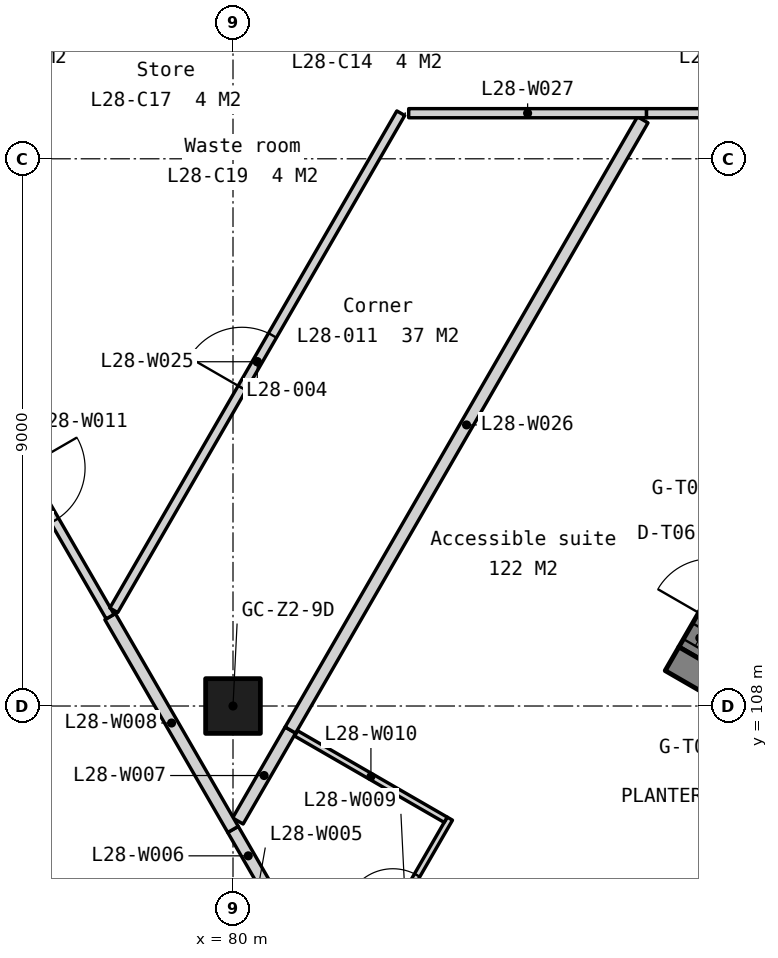
"""IFC4 building model, lengths in metres.
Left out: names, types, materials, properties, quantities, classifications, styles, units other than length and angle.
Written with IfcOpenShell. Run it as: python <this file> out.ifc"""

import sys

from ifc_helpers import new_model, si_unit, direction, frame, frame_2d, origin, origin_2d, place, context, subcontext, project, spatial, polyline, rectangle, outline, extrude, element, fill, save


model = new_model("IFC4")
c1 = context("Model", 3, precision=1e-05, world=origin(), true_north=direction((0.0, 1.0)))
c2 = subcontext(c1, "Body", "Model", "MODEL_VIEW")
j1 = project(units=[si_unit("LENGTHUNIT", "METRE"), si_unit("PLANEANGLEUNIT", "RADIAN")], contexts=[c1])
p1 = place(None, origin())
s1 = spatial("IfcSite", under=j1, at=p1, CompositionType="ELEMENT")
p2 = place(p1, origin())
s2 = spatial("IfcBuilding", under=s1, at=p2, CompositionType="ELEMENT")
p3 = place(p2, frame((0.0, 0.0, 113.3)))
s3 = spatial("IfcBuildingStorey", under=s2, at=p3, CompositionType="ELEMENT", Elevation=113.3)
p4 = place(p3, frame((80.0, 108.0, 0.0), z_axis=(0.0, 0.0, 1.0), x_axis=(1.0, 0.0, 0.0)))
e1 = element("IfcColumn", 1, at=p4, inside=s3, PredefinedType="COLUMN", context=c2, shape_type="SweptSolid", body=[
    extrude(rectangle(XDim=0.9, YDim=0.9, at=origin_2d()), origin(), (0.0, 0.0, 1.0), 3.5),
])
p5 = place(p3, frame((56.073, 130.263, -0.15), z_axis=(0.0, 0.0, 1.0), x_axis=(0.500000478905, -0.866025127289, 0.0)))
e2 = element("IfcWall", 2, at=p5, inside=s3, PredefinedType="SOLIDWALL", context=c2, shape_type="SweptSolid", body=[
    extrude(outline(polyline([(42.643, 0.0), (42.643, 3.5), (0.0, 3.5), (0.0, 0.0), (42.643, 0.0)])), frame((0.0, 0.225, 0.0), z_axis=(0.0, -1.0, 0.0), x_axis=(1.0, 0.0, 0.0)), (0.0, 0.0, 1.0), 0.45),
])
p6 = place(p5, frame((7.079, 0.0, 1.05)))
e3 = element("IfcOpeningElement", 3, at=p6, cuts=e2, PredefinedType="OPENING", context=c2, shape_type="SweptSolid", body=[
    extrude(rectangle(XDim=1.2, YDim=1.5, at=frame_2d((0.6, 0.75))), frame((0.0, 0.235, 0.0), z_axis=(0.0, -1.0, 0.0), x_axis=(1.0, 0.0, 0.0)), (0.0, 0.0, 1.0), 0.47),
])
p7 = place(p5, frame((8.779, 0.0, 1.05)))
e4 = element("IfcOpeningElement", 4, at=p7, cuts=e2, PredefinedType="OPENING", context=c2, shape_type="SweptSolid", body=[
    extrude(rectangle(XDim=1.2, YDim=1.5, at=frame_2d((0.6, 0.75))), frame((0.0, 0.235, 0.0), z_axis=(0.0, -1.0, 0.0), x_axis=(1.0, 0.0, 0.0)), (0.0, 0.0, 1.0), 0.47),
])
p8 = place(p5, frame((15.607, 0.0, 1.05)))
e5 = element("IfcOpeningElement", 5, at=p8, cuts=e2, PredefinedType="OPENING", context=c2, shape_type="SweptSolid", body=[
    extrude(rectangle(XDim=1.2, YDim=1.5, at=frame_2d((0.6, 0.75))), frame((0.0, 0.235, 0.0), z_axis=(0.0, -1.0, 0.0), x_axis=(1.0, 0.0, 0.0)), (0.0, 0.0, 1.0), 0.47),
])
p9 = place(p5, frame((17.307, 0.0, 1.05)))
e6 = element("IfcOpeningElement", 6, at=p9, cuts=e2, PredefinedType="OPENING", context=c2, shape_type="SweptSolid", body=[
    extrude(rectangle(XDim=1.2, YDim=1.5, at=frame_2d((0.6, 0.75))), frame((0.0, 0.235, 0.0), z_axis=(0.0, -1.0, 0.0), x_axis=(1.0, 0.0, 0.0)), (0.0, 0.0, 1.0), 0.47),
])
p10 = place(p5, frame((24.136, 0.0, 1.05)))
e7 = element("IfcOpeningElement", 7, at=p10, cuts=e2, PredefinedType="OPENING", context=c2, shape_type="SweptSolid", body=[
    extrude(rectangle(XDim=1.2, YDim=1.5, at=frame_2d((0.6, 0.75))), frame((0.0, 0.235, 0.0), z_axis=(0.0, -1.0, 0.0), x_axis=(1.0, 0.0, 0.0)), (0.0, 0.0, 1.0), 0.47),
])
p11 = place(p5, frame((25.836, 0.0, 1.05)))
e8 = element("IfcOpeningElement", 8, at=p11, cuts=e2, PredefinedType="OPENING", context=c2, shape_type="SweptSolid", body=[
    extrude(rectangle(XDim=1.2, YDim=1.5, at=frame_2d((0.6, 0.75))), frame((0.0, 0.235, 0.0), z_axis=(0.0, -1.0, 0.0), x_axis=(1.0, 0.0, 0.0)), (0.0, 0.0, 1.0), 0.47),
])
p12 = place(p5, frame((32.665, 0.0, 1.05)))
e9 = element("IfcOpeningElement", 9, at=p12, cuts=e2, PredefinedType="OPENING", context=c2, shape_type="SweptSolid", body=[
    extrude(rectangle(XDim=1.2, YDim=1.5, at=frame_2d((0.6, 0.75))), frame((0.0, 0.235, 0.0), z_axis=(0.0, -1.0, 0.0), x_axis=(1.0, 0.0, 0.0)), (0.0, 0.0, 1.0), 0.47),
])
p13 = place(p5, frame((34.365, 0.0, 1.05)))
e10 = element("IfcOpeningElement", 10, at=p13, cuts=e2, PredefinedType="OPENING", context=c2, shape_type="SweptSolid", body=[
    extrude(rectangle(XDim=1.2, YDim=1.5, at=frame_2d((0.6, 0.75))), frame((0.0, 0.235, 0.0), z_axis=(0.0, -1.0, 0.0), x_axis=(1.0, 0.0, 0.0)), (0.0, 0.0, 1.0), 0.47),
])
p14 = place(p3, frame((82.605, 93.333, -0.15), z_axis=(0.0, 0.0, 1.0), x_axis=(0.499991795389, 0.866030140667, 0.0)))
e11 = element("IfcWall", 11, at=p14, inside=s3, PredefinedType="SOLIDWALL", context=c2, shape_type="SweptSolid", body=[
    extrude(outline(polyline([(0.0, 0.0), (0.0, 3.5), (15.457, 3.5), (15.457, 0.0), (0.0, 0.0)])), frame((0.0, 0.225, 0.0), z_axis=(0.0, -1.0, 0.0), x_axis=(1.0, 0.0, 0.0)), (0.0, 0.0, 1.0), 0.45),
])
p15 = place(p14, frame((7.079, 0.0, 1.05)))
e12 = element("IfcOpeningElement", 12, at=p15, cuts=e11, PredefinedType="OPENING", context=c2, shape_type="SweptSolid", body=[
    extrude(rectangle(XDim=1.2, YDim=1.5, at=frame_2d((0.6, 0.75))), frame((0.0, 0.235, 0.0), z_axis=(0.0, -1.0, 0.0), x_axis=(1.0, 0.0, 0.0)), (0.0, 0.0, 1.0), 0.47),
])
p16 = place(p14, frame((8.779, 0.0, 1.05)))
e13 = element("IfcOpeningElement", 13, at=p16, cuts=e11, PredefinedType="OPENING", context=c2, shape_type="SweptSolid", body=[
    extrude(rectangle(XDim=1.2, YDim=1.5, at=frame_2d((0.6, 0.75))), frame((0.0, 0.235, 0.0), z_axis=(0.0, -1.0, 0.0), x_axis=(1.0, 0.0, 0.0)), (0.0, 0.0, 1.0), 0.47),
])
p17 = place(p3, frame((90.641, 106.802, 0.0), z_axis=(0.0, 0.0, 1.0), x_axis=(-0.866047669374, 0.499961432884, 0.0)))
e14 = element("IfcWall", 14, at=p17, inside=s3, PredefinedType="SOLIDWALL", context=c2, shape_type="SweptSolid", body=[
    extrude(rectangle(XDim=3.95, YDim=0.45, at=frame_2d((1.975, 0.0))), origin(), (0.0, 0.0, 1.0), 6.85),
])
p18 = place(p3, frame((87.528, 108.859, -0.15), z_axis=(0.0, 0.0, 1.0), x_axis=(0.500077740698, 0.865980515519, 0.0)))
e15 = element("IfcWall", 15, at=p18, inside=s3, PredefinedType="SOLIDWALL", context=c2, shape_type="SweptSolid", body=[
    extrude(rectangle(XDim=2.3, YDim=0.45, at=frame_2d((1.15, 0.0))), origin(), (0.0, 0.0, 1.0), 3.5),
])
p19 = place(p18, frame((0.65, 0.0, 0.15)))
e16 = element("IfcOpeningElement", 16, at=p19, cuts=e15, PredefinedType="OPENING", context=c2, shape_type="SweptSolid", body=[
    extrude(rectangle(XDim=1.0, YDim=2.4, at=frame_2d((0.5, 1.2))), frame((0.0, 0.235, 0.0), z_axis=(0.0, -1.0, 0.0), x_axis=(1.0, 0.0, 0.0)), (0.0, 0.0, 1.0), 0.47),
])
p20 = place(p18, frame((0.15, 0.0, 0.15)))
e17 = element("IfcOpeningElement", 17, at=p20, cuts=e15, PredefinedType="OPENING", context=c2, shape_type="SweptSolid", body=[
    extrude(rectangle(XDim=0.3, YDim=2.4, at=frame_2d((0.15, 1.2))), frame((0.0, 0.235, 0.0), z_axis=(0.0, -1.0, 0.0), x_axis=(1.0, 0.0, 0.0)), (0.0, 0.0, 1.0), 0.47),
])
p21 = place(p18, frame((1.85, 0.0, 0.15)))
e18 = element("IfcOpeningElement", 18, at=p21, cuts=e15, PredefinedType="OPENING", context=c2, shape_type="SweptSolid", body=[
    extrude(rectangle(XDim=0.3, YDim=2.4, at=frame_2d((0.15, 1.2))), frame((0.0, 0.235, 0.0), z_axis=(0.0, -1.0, 0.0), x_axis=(1.0, 0.0, 0.0)), (0.0, 0.0, 1.0), 0.47),
])
p22 = place(p3, frame((80.0, 105.97, 0.0), z_axis=(0.0, 0.0, 1.0), x_axis=(0.499567963903, -0.866274696295, 0.0)))
e19 = element("IfcWall", 19, at=p22, inside=s3, PredefinedType="PARTITIONING", context=c2, shape_type="SweptSolid", body=[
    extrude(rectangle(XDim=1.003, YDim=0.2, at=frame_2d((0.502, 0.0))), origin(), (0.0, 0.0, 1.0), 3.35),
])
p23 = place(p3, frame((80.08, 106.109, 0.0), z_axis=(0.0, 0.0, 1.0), x_axis=(0.500032554596, 0.866006607564, 0.0)))
e20 = element("IfcWall", 20, at=p23, inside=s3, PredefinedType="PARTITIONING", context=c2, shape_type="SweptSolid", body=[
    extrude(rectangle(XDim=1.727, YDim=0.2, at=frame_2d((0.863, 0.0))), origin(), (0.0, 0.0, 1.0), 3.35),
])
p24 = place(p3, frame((77.979, 109.47, 0.0), z_axis=(0.0, 0.0, 1.0), x_axis=(0.50000482701, -0.866022616891, 0.0)))
e21 = element("IfcWall", 21, at=p24, inside=s3, PredefinedType="PARTITIONING", context=c2, shape_type="SweptSolid", body=[
    extrude(rectangle(XDim=4.042, YDim=0.2, at=frame_2d((2.021, 0.0))), origin(), (0.0, 0.0, 1.0), 3.35),
])
p25 = place(p3, frame((82.091, 103.593, 0.0), z_axis=(0.0, 0.0, 1.0), x_axis=(0.500001826776, 0.866024349092, 0.0)))
e22 = element("IfcWall", 22, at=p25, inside=s3, PredefinedType="PARTITIONING", context=c2, shape_type="SweptSolid", body=[
    extrude(rectangle(XDim=2.95, YDim=0.1, at=frame_2d((1.475, 0.0))), origin(), (0.0, 0.0, 1.0), 3.35),
])
p26 = place(p25, frame((1.075, 0.0, 0.0)))
e23 = element("IfcOpeningElement", 23, at=p26, cuts=e22, PredefinedType="OPENING", context=c2, shape_type="SweptSolid", body=[
    extrude(rectangle(XDim=0.8, YDim=2.1, at=frame_2d((0.4, 1.05))), frame((0.0, 0.06, 0.0), z_axis=(0.0, -1.0, 0.0), x_axis=(1.0, 0.0, 0.0)), (0.0, 0.0, 1.0), 0.12),
])
p27 = place(p3, frame((81.039, 107.549, 0.0), z_axis=(0.0, 0.0, 1.0), x_axis=(0.866033839264, -0.499985389037, 0.0)))
e24 = element("IfcWall", 24, at=p27, inside=s3, PredefinedType="PARTITIONING", context=c2, shape_type="SweptSolid", body=[
    extrude(rectangle(XDim=2.84, YDim=0.1, at=frame_2d((1.42, 0.0))), origin(), (0.0, 0.0, 1.0), 3.35),
])
p28 = place(p3, frame((75.655, 113.496, 0.0), z_axis=(0.0, 0.0, 1.0), x_axis=(0.499986163319, -0.866033392248, 0.0)))
e25 = element("IfcWall", 25, at=p28, inside=s3, PredefinedType="PARTITIONING", context=c2, shape_type="SweptSolid", body=[
    extrude(rectangle(XDim=4.648, YDim=0.15, at=frame_2d((2.324, 0.0))), origin(), (0.0, 0.0, 1.0), 3.35),
])
p29 = place(p28, frame((1.824, 0.0, 0.0)))
e26 = element("IfcOpeningElement", 26, at=p29, cuts=e25, PredefinedType="OPENING", context=c2, shape_type="SweptSolid", body=[
    extrude(rectangle(XDim=1.0, YDim=2.1, at=frame_2d((0.5, 1.05))), frame((0.0, 0.085, 0.0), z_axis=(0.0, -1.0, 0.0), x_axis=(1.0, 0.0, 0.0)), (0.0, 0.0, 1.0), 0.17),
])
p30 = place(p3, frame((78.039, 109.574, 0.0), z_axis=(0.0, 0.0, 1.0), x_axis=(0.50000526672, 0.866022363021, 0.0)))
e27 = element("IfcWall", 27, at=p30, inside=s3, PredefinedType="PARTITIONING", context=c2, shape_type="SweptSolid", body=[
    extrude(rectangle(XDim=9.44, YDim=0.15, at=frame_2d((4.72, 0.0))), origin(), (0.0, 0.0, 1.0), 3.35),
])
p31 = place(p30, frame((4.22, 0.0, 0.0)))
e28 = element("IfcOpeningElement", 28, at=p31, cuts=e27, PredefinedType="OPENING", context=c2, shape_type="SweptSolid", body=[
    extrude(rectangle(XDim=1.0, YDim=2.1, at=frame_2d((0.5, 1.05))), frame((0.0, 0.085, 0.0), z_axis=(0.0, -1.0, 0.0), x_axis=(1.0, 0.0, 0.0)), (0.0, 0.0, 1.0), 0.17),
])
p32 = place(p3, frame((80.943, 107.604, 0.0), z_axis=(0.0, 0.0, 1.0), x_axis=(0.499981374323, 0.866036157057, 0.0)))
e29 = element("IfcWall", 29, at=p32, inside=s3, PredefinedType="PARTITIONING", context=c2, shape_type="SweptSolid", body=[
    extrude(rectangle(XDim=11.59, YDim=0.2, at=frame_2d((5.795, 0.0))), origin(), (0.0, 0.0, 1.0), 3.35),
])
p33 = place(p3, frame((82.889, 117.75, 0.0), z_axis=(0.0, 0.0, 1.0), x_axis=(1.0, 0.0, 0.0)))
e30 = element("IfcWall", 30, at=p33, inside=s3, PredefinedType="PARTITIONING", context=c2, shape_type="SweptSolid", body=[
    extrude(rectangle(XDim=3.911, YDim=0.15, at=frame_2d((1.956, 0.0))), origin(), (0.0, 0.0, 1.0), 3.35),
])
p34 = place(p3, frame((86.801, 117.75, 0.0), z_axis=(0.0, 0.0, 1.0), x_axis=(1.0, 0.0, 0.0)))
e31 = element("IfcWall", 31, at=p34, inside=s3, PredefinedType="PARTITIONING", context=c2, shape_type="SweptSolid", body=[
    extrude(rectangle(XDim=9.074, YDim=0.15, at=frame_2d((4.537, 0.0))), origin(), (0.0, 0.0, 1.0), 3.35),
])
p35 = place(p34, frame((4.037, 0.0, 0.0)))
e32 = element("IfcOpeningElement", 32, at=p35, cuts=e31, PredefinedType="OPENING", context=c2, shape_type="SweptSolid", body=[
    extrude(rectangle(XDim=1.0, YDim=2.1, at=frame_2d((0.5, 1.05))), frame((0.0, 0.085, 0.0), z_axis=(0.0, -1.0, 0.0), x_axis=(1.0, 0.0, 0.0)), (0.0, 0.0, 1.0), 0.17),
])
p36 = place(p20, origin())
e33 = element("IfcWindow", 33, at=p36, inside=s3, PartitioningType="SINGLE_PANEL", PredefinedType="WINDOW", context=c2, shape_type="SweptSolid", body=[
    extrude(rectangle(XDim=0.3, YDim=2.4, at=frame_2d((0.15, 1.2))), frame((0.0, 0.03, 0.0), z_axis=(0.0, -1.0, 0.0), x_axis=(1.0, 0.0, 0.0)), (0.0, 0.0, 1.0), 0.06),
])
fill(e17, e33)
p37 = place(p29, origin())
e34 = element("IfcDoor", 34, at=p37, inside=s3, OperationType="SINGLE_SWING_LEFT", PredefinedType="DOOR", context=c2, shape_type="SweptSolid", body=[
    extrude(rectangle(XDim=1.0, YDim=2.1, at=frame_2d((0.5, 1.05))), frame((0.0, 0.025, 0.0), z_axis=(0.0, -1.0, 0.0), x_axis=(1.0, 0.0, 0.0)), (0.0, 0.0, 1.0), 0.05),
])
fill(e26, e34)
p38 = place(p31, origin())
e35 = element("IfcDoor", 35, at=p38, inside=s3, OperationType="SINGLE_SWING_LEFT", PredefinedType="DOOR", context=c2, shape_type="SweptSolid", body=[
    extrude(rectangle(XDim=1.0, YDim=2.1, at=frame_2d((0.5, 1.05))), frame((0.0, 0.025, 0.0), z_axis=(0.0, -1.0, 0.0), x_axis=(1.0, 0.0, 0.0)), (0.0, 0.0, 1.0), 0.05),
])
fill(e28, e35)
p39 = place(p26, origin())
e36 = element("IfcDoor", 36, at=p39, inside=s3, OperationType="SINGLE_SWING_LEFT", PredefinedType="DOOR", context=c2, shape_type="SweptSolid", body=[
    extrude(rectangle(XDim=0.8, YDim=2.1, at=frame_2d((0.4, 1.05))), frame((0.0, 0.025, 0.0), z_axis=(0.0, -1.0, 0.0), x_axis=(1.0, 0.0, 0.0)), (0.0, 0.0, 1.0), 0.05),
])
fill(e23, e36)
save(model, sys.argv[1])
